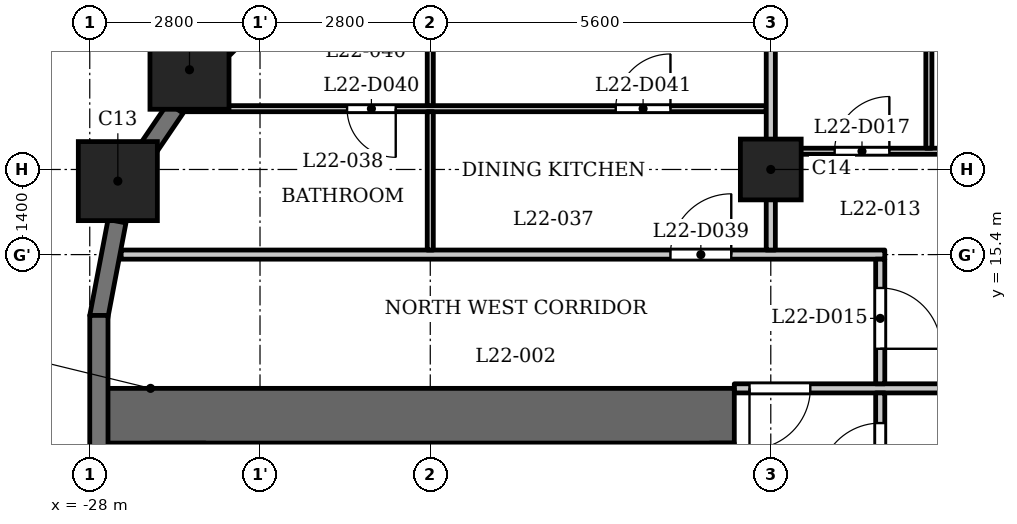
"""IFC4 building model, lengths in metres.
Left out: names, types, materials, properties, quantities, classifications, styles, units other than length and angle.
Written with IfcOpenShell. Run it as: python <this file> out.ifc"""

import sys

from ifc_helpers import new_model, si_unit, direction, frame, frame_2d, origin, origin_2d, place, context, subcontext, project, spatial, rectangle, extrude, element, fill, save


model = new_model("IFC4")
c1 = context("Model", 3, precision=1e-05, world=origin(), true_north=direction((0.0, 1.0)))
c2 = subcontext(c1, "Body", "Model", "MODEL_VIEW")
j1 = project(units=[si_unit("LENGTHUNIT", "METRE"), si_unit("PLANEANGLEUNIT", "RADIAN")], contexts=[c1])
p1 = place(None, origin())
s1 = spatial("IfcSite", under=j1, at=p1, CompositionType="ELEMENT")
p2 = place(p1, origin())
s2 = spatial("IfcBuilding", under=s1, at=p2, CompositionType="ELEMENT")
p3 = place(p2, frame((0.0, 0.0, 90.3)))
s3 = spatial("IfcBuildingStorey", under=s2, at=p3, CompositionType="ELEMENT", Elevation=90.3)
for number, where, z_axis, x_axis in (
    (1, (-26.36, 18.44, 0.0), (0.0, 0.0, 1.0), (1.0, 0.0, 0.0)),
    (2, (-27.538, 16.609, 0.0), (0.0, 0.0, 1.0), (1.0, 0.0, 0.0)),
):
    element("IfcColumn", number, at=place(p3, frame(where, z_axis=z_axis, x_axis=x_axis)), inside=s3, PredefinedType="COLUMN", context=c2, shape_type="SweptSolid", body=[
        extrude(rectangle(XDim=1.3, YDim=1.3, at=origin_2d()), origin(), (0.0, 0.0, 1.0), 3.5),
    ])
p4 = place(p3, frame((-16.8, 16.8, 0.0), z_axis=(0.0, 0.0, 1.0), x_axis=(1.0, 0.0, 0.0)))
e3 = element("IfcColumn", 3, at=p4, inside=s3, PredefinedType="COLUMN", context=c2, shape_type="SweptSolid", body=[
    extrude(rectangle(XDim=1.0, YDim=1.0, at=origin_2d()), origin(), (0.0, 0.0, 1.0), 3.5),
])
p5 = place(p3, frame((-23.991, 20.597, 0.0), z_axis=(0.0, 0.0, 1.0), x_axis=(-0.707106781187, -0.707106781187, 0.0)))
e4 = element("IfcWall", 4, at=p5, inside=s3, PredefinedType="SOLIDWALL", context=c2, shape_type="SweptSolid", body=[
    extrude(rectangle(XDim=2.55, YDim=0.3, at=frame_2d((1.275, 0.0))), origin(), (0.0, 0.0, 1.0), 2.4),
])
p6 = place(p5, frame((0.875, 0.0, 0.6)))
e5 = element("IfcOpeningElement", 5, at=p6, cuts=e4, PredefinedType="OPENING", context=c2, shape_type="SweptSolid", body=[
    extrude(rectangle(XDim=0.8, YDim=1.55, at=frame_2d((0.4, 0.775))), frame((0.0, 0.16, 0.0), z_axis=(0.0, -1.0, 0.0), x_axis=(1.0, 0.0, 0.0)), (0.0, 0.0, 1.0), 0.32),
])
p7 = place(p3, frame((-26.589, 17.81, 0.0), z_axis=(0.0, 0.0, 1.0), x_axis=(-0.562066330934, -0.827092159091, 0.0)))
e6 = element("IfcWall", 6, at=p7, inside=s3, PredefinedType="SOLIDWALL", context=c2, shape_type="SweptSolid", body=[
    extrude(rectangle(XDim=0.877, YDim=0.3, at=frame_2d((0.438, 0.0))), origin(), (0.0, 0.0, 1.0), 3.2),
])
p8 = place(p3, frame((-27.552, 15.949, 0.0), z_axis=(0.0, 0.0, 1.0), x_axis=(-0.187279751651, -0.982306619453, 0.0)))
e7 = element("IfcWall", 7, at=p8, inside=s3, PredefinedType="SOLIDWALL", context=c2, shape_type="SweptSolid", body=[
    extrude(rectangle(XDim=1.606, YDim=0.3, at=frame_2d((0.803, 0.0))), origin(), (0.0, 0.0, 1.0), 2.4),
])
p9 = place(p3, frame((-27.85, 14.4, 0.0), z_axis=(0.0, 0.0, 1.0), x_axis=(0.0, -1.0, 0.0)))
e8 = element("IfcWall", 8, at=p9, inside=s3, PredefinedType="SOLIDWALL", context=c2, shape_type="SweptSolid", body=[
    extrude(rectangle(XDim=2.55, YDim=0.3, at=frame_2d((1.275, 0.0))), origin(), (0.0, 0.0, 1.0), 2.4),
])
p10 = place(p3, frame((-17.4, 12.75, 0.0), z_axis=(0.0, 0.0, 1.0), x_axis=(-1.0, 0.0, 0.0)))
e9 = element("IfcWall", 9, at=p10, inside=s3, PredefinedType="SHEAR", context=c2, shape_type="SweptSolid", body=[
    extrude(rectangle(XDim=10.4, YDim=0.9, at=frame_2d((5.2, 0.0))), origin(), (0.0, 0.0, 1.0), 3.2),
])
p11 = place(p3, frame((-17.6, -12.3, 0.0), z_axis=(0.0, 0.0, 1.0), x_axis=(0.0, 1.0, 0.0)))
e10 = element("IfcWall", 10, at=p11, inside=s3, PredefinedType="SHEAR", context=c2, shape_type="SweptSolid", body=[
    extrude(rectangle(XDim=24.6, YDim=0.4, at=frame_2d((12.3, 0.0))), origin(), (0.0, 0.0, 1.0), 3.2),
])
p12 = place(p11, frame((6.0, 0.0, 0.0)))
e11 = element("IfcOpeningElement", 11, at=p12, cuts=e10, PredefinedType="OPENING", context=c2, shape_type="SweptSolid", body=[
    extrude(rectangle(XDim=1.1, YDim=2.1, at=frame_2d((0.55, 1.05))), frame((0.0, 0.21, 0.0), z_axis=(0.0, -1.0, 0.0), x_axis=(1.0, 0.0, 0.0)), (0.0, 0.0, 1.0), 0.42),
])
p13 = place(p11, frame((8.4, 0.0, 0.0)))
e12 = element("IfcOpeningElement", 12, at=p13, cuts=e10, PredefinedType="OPENING", context=c2, shape_type="SweptSolid", body=[
    extrude(rectangle(XDim=1.1, YDim=2.1, at=frame_2d((0.55, 1.05))), frame((0.0, 0.21, 0.0), z_axis=(0.0, -1.0, 0.0), x_axis=(1.0, 0.0, 0.0)), (0.0, 0.0, 1.0), 0.42),
])
p14 = place(p11, frame((10.8, 0.0, 0.0)))
e13 = element("IfcOpeningElement", 13, at=p14, cuts=e10, PredefinedType="OPENING", context=c2, shape_type="SweptSolid", body=[
    extrude(rectangle(XDim=1.1, YDim=2.1, at=frame_2d((0.55, 1.05))), frame((0.0, 0.21, 0.0), z_axis=(0.0, -1.0, 0.0), x_axis=(1.0, 0.0, 0.0)), (0.0, 0.0, 1.0), 0.42),
])
p15 = place(p11, frame((16.75, 0.0, 0.0)))
e14 = element("IfcOpeningElement", 14, at=p15, cuts=e10, PredefinedType="OPENING", context=c2, shape_type="SweptSolid", body=[
    extrude(rectangle(XDim=0.9, YDim=2.1, at=frame_2d((0.45, 1.05))), frame((0.0, 0.21, 0.0), z_axis=(0.0, -1.0, 0.0), x_axis=(1.0, 0.0, 0.0)), (0.0, 0.0, 1.0), 0.42),
])
p16 = place(p11, frame((22.8, 0.0, 0.0)))
e15 = element("IfcOpeningElement", 15, at=p16, cuts=e10, PredefinedType="OPENING", context=c2, shape_type="SweptSolid", body=[
    extrude(rectangle(XDim=1.1, YDim=2.1, at=frame_2d((0.55, 1.05))), frame((0.0, 0.21, 0.0), z_axis=(0.0, -1.0, 0.0), x_axis=(1.0, 0.0, 0.0)), (0.0, 0.0, 1.0), 0.42),
])
p17 = place(p11, frame((0.7, 0.0, 0.0)))
e16 = element("IfcOpeningElement", 16, at=p17, cuts=e10, PredefinedType="OPENING", context=c2, shape_type="SweptSolid", body=[
    extrude(rectangle(XDim=1.1, YDim=2.1, at=frame_2d((0.55, 1.05))), frame((0.0, 0.21, 0.0), z_axis=(0.0, -1.0, 0.0), x_axis=(1.0, 0.0, 0.0)), (0.0, 0.0, 1.0), 0.42),
])
p18 = place(p11, frame((12.775, 0.0, 0.0)))
e17 = element("IfcOpeningElement", 17, at=p18, cuts=e10, PredefinedType="OPENING", context=c2, shape_type="SweptSolid", body=[
    extrude(rectangle(XDim=1.8, YDim=2.1, at=frame_2d((0.9, 1.05))), frame((0.0, 0.21, 0.0), z_axis=(0.0, -1.0, 0.0), x_axis=(1.0, 0.0, 0.0)), (0.0, 0.0, 1.0), 0.42),
])
p19 = place(p3, frame((-26.55, -12.3, 0.0), z_axis=(0.0, 0.0, 1.0), x_axis=(0.0, 1.0, 0.0)))
e18 = element("IfcWall", 18, at=p19, inside=s3, PredefinedType="SHEAR", context=c2, shape_type="SweptSolid", body=[
    extrude(rectangle(XDim=24.6, YDim=0.9, at=frame_2d((12.3, 0.0))), origin(), (0.0, 0.0, 1.0), 3.2),
])
p20 = place(p3, frame((-23.55, 9.8, 0.0), z_axis=(0.0, 0.0, 1.0), x_axis=(0.0, 1.0, 0.0)))
e19 = element("IfcWall", 19, at=p20, inside=s3, PredefinedType="PARTITIONING", context=c2, shape_type="SweptSolid", body=[
    extrude(rectangle(XDim=2.5, YDim=0.2, at=frame_2d((1.25, 0.0))), origin(), (0.0, 0.0, 1.0), 3.2),
])
p21 = place(p20, frame((0.8, 0.0, 0.0)))
e20 = element("IfcOpeningElement", 20, at=p21, cuts=e19, PredefinedType="OPENING", context=c2, shape_type="SweptSolid", body=[
    extrude(rectangle(XDim=0.9, YDim=2.1, at=frame_2d((0.45, 1.05))), frame((0.0, 0.11, 0.0), z_axis=(0.0, -1.0, 0.0), x_axis=(1.0, 0.0, 0.0)), (0.0, 0.0, 1.0), 0.22),
])
p22 = place(p3, frame((-17.4, 13.2, 0.0), z_axis=(0.0, 0.0, 1.0), x_axis=(1.0, 0.0, 0.0)))
e21 = element("IfcWall", 21, at=p22, inside=s3, PredefinedType="PARTITIONING", context=c2, shape_type="SweptSolid", body=[
    extrude(rectangle(XDim=34.8, YDim=0.15, at=frame_2d((17.4, 0.0))), origin(), (0.0, 0.0, 1.0), 3.2),
])
p23 = place(p22, frame((0.25, 0.0, 0.0)))
e22 = element("IfcOpeningElement", 22, at=p23, cuts=e21, PredefinedType="OPENING", context=c2, shape_type="SweptSolid", body=[
    extrude(rectangle(XDim=1.0, YDim=2.1, at=frame_2d((0.5, 1.05))), frame((0.0, 0.085, 0.0), z_axis=(0.0, -1.0, 0.0), x_axis=(1.0, 0.0, 0.0)), (0.0, 0.0, 1.0), 0.17),
])
p24 = place(p22, frame((33.65, 0.0, 0.0)))
e23 = element("IfcOpeningElement", 23, at=p24, cuts=e21, PredefinedType="OPENING", context=c2, shape_type="SweptSolid", body=[
    extrude(rectangle(XDim=1.0, YDim=2.1, at=frame_2d((0.5, 1.05))), frame((0.0, 0.085, 0.0), z_axis=(0.0, -1.0, 0.0), x_axis=(1.0, 0.0, 0.0)), (0.0, 0.0, 1.0), 0.17),
])
p25 = place(p22, frame((15.75, 0.0, 0.0)))
e24 = element("IfcOpeningElement", 24, at=p25, cuts=e21, PredefinedType="OPENING", context=c2, shape_type="SweptSolid", body=[
    extrude(rectangle(XDim=1.0, YDim=2.1, at=frame_2d((0.5, 1.05))), frame((0.0, 0.085, 0.0), z_axis=(0.0, -1.0, 0.0), x_axis=(1.0, 0.0, 0.0)), (0.0, 0.0, 1.0), 0.17),
])
p26 = place(p22, frame((21.35, 0.0, 0.0)))
e25 = element("IfcOpeningElement", 25, at=p26, cuts=e21, PredefinedType="OPENING", context=c2, shape_type="SweptSolid", body=[
    extrude(rectangle(XDim=1.0, YDim=2.1, at=frame_2d((0.5, 1.05))), frame((0.0, 0.085, 0.0), z_axis=(0.0, -1.0, 0.0), x_axis=(1.0, 0.0, 0.0)), (0.0, 0.0, 1.0), 0.17),
])
p27 = place(p3, frame((-27.484, 15.4, 0.0), z_axis=(0.0, 0.0, 1.0), x_axis=(1.0, 0.0, 0.0)))
e26 = element("IfcWall", 26, at=p27, inside=s3, PredefinedType="PARTITIONING", context=c2, shape_type="SweptSolid", body=[
    extrude(rectangle(XDim=12.559, YDim=0.15, at=frame_2d((6.279, 0.0))), origin(), (0.0, 0.0, 1.0), 3.2),
])
p28 = place(p27, frame((9.034, 0.0, 0.0)))
e27 = element("IfcOpeningElement", 27, at=p28, cuts=e26, PredefinedType="OPENING", context=c2, shape_type="SweptSolid", body=[
    extrude(rectangle(XDim=1.0, YDim=2.1, at=frame_2d((0.5, 1.05))), frame((0.0, 0.085, 0.0), z_axis=(0.0, -1.0, 0.0), x_axis=(1.0, 0.0, 0.0)), (0.0, 0.0, 1.0), 0.17),
])
p29 = place(p3, frame((-16.725, 17.1, 0.0), z_axis=(0.0, 0.0, 1.0), x_axis=(1.0, 0.0, 0.0)))
e28 = element("IfcWall", 28, at=p29, inside=s3, PredefinedType="PARTITIONING", context=c2, shape_type="SweptSolid", body=[
    extrude(rectangle(XDim=33.45, YDim=0.1, at=frame_2d((16.725, 0.0))), origin(), (0.0, 0.0, 1.0), 3.2),
])
p30 = place(p29, frame((3.925, 0.0, 0.0)))
e29 = element("IfcOpeningElement", 29, at=p30, cuts=e28, PredefinedType="OPENING", context=c2, shape_type="SweptSolid", body=[
    extrude(rectangle(XDim=0.8, YDim=2.1, at=frame_2d((0.4, 1.05))), frame((0.0, 0.06, 0.0), z_axis=(0.0, -1.0, 0.0), x_axis=(1.0, 0.0, 0.0)), (0.0, 0.0, 1.0), 0.12),
])
p31 = place(p29, frame((0.975, 0.0, 0.0)))
e30 = element("IfcOpeningElement", 30, at=p31, cuts=e28, PredefinedType="OPENING", context=c2, shape_type="SweptSolid", body=[
    extrude(rectangle(XDim=0.9, YDim=2.1, at=frame_2d((0.45, 1.05))), frame((0.0, 0.06, 0.0), z_axis=(0.0, -1.0, 0.0), x_axis=(1.0, 0.0, 0.0)), (0.0, 0.0, 1.0), 0.12),
])
p32 = place(p29, frame((6.425, 0.0, 0.0)))
e31 = element("IfcOpeningElement", 31, at=p32, cuts=e28, PredefinedType="OPENING", context=c2, shape_type="SweptSolid", body=[
    extrude(rectangle(XDim=0.8, YDim=2.1, at=frame_2d((0.4, 1.05))), frame((0.0, 0.06, 0.0), z_axis=(0.0, -1.0, 0.0), x_axis=(1.0, 0.0, 0.0)), (0.0, 0.0, 1.0), 0.12),
])
p33 = place(p29, frame((8.825, 0.0, 0.0)))
e32 = element("IfcOpeningElement", 32, at=p33, cuts=e28, PredefinedType="OPENING", context=c2, shape_type="SweptSolid", body=[
    extrude(rectangle(XDim=0.9, YDim=2.1, at=frame_2d((0.45, 1.05))), frame((0.0, 0.06, 0.0), z_axis=(0.0, -1.0, 0.0), x_axis=(1.0, 0.0, 0.0)), (0.0, 0.0, 1.0), 0.12),
])
p34 = place(p29, frame((12.375, 0.0, 0.0)))
e33 = element("IfcOpeningElement", 33, at=p34, cuts=e28, PredefinedType="OPENING", context=c2, shape_type="SweptSolid", body=[
    extrude(rectangle(XDim=0.9, YDim=2.1, at=frame_2d((0.45, 1.05))), frame((0.0, 0.06, 0.0), z_axis=(0.0, -1.0, 0.0), x_axis=(1.0, 0.0, 0.0)), (0.0, 0.0, 1.0), 0.12),
])
p35 = place(p29, frame((14.425, 0.0, 0.0)))
e34 = element("IfcOpeningElement", 34, at=p35, cuts=e28, PredefinedType="OPENING", context=c2, shape_type="SweptSolid", body=[
    extrude(rectangle(XDim=0.9, YDim=2.1, at=frame_2d((0.45, 1.05))), frame((0.0, 0.06, 0.0), z_axis=(0.0, -1.0, 0.0), x_axis=(1.0, 0.0, 0.0)), (0.0, 0.0, 1.0), 0.12),
])
p36 = place(p29, frame((26.225, 0.0, 0.0)))
e35 = element("IfcOpeningElement", 35, at=p36, cuts=e28, PredefinedType="OPENING", context=c2, shape_type="SweptSolid", body=[
    extrude(rectangle(XDim=0.8, YDim=2.1, at=frame_2d((0.4, 1.05))), frame((0.0, 0.06, 0.0), z_axis=(0.0, -1.0, 0.0), x_axis=(1.0, 0.0, 0.0)), (0.0, 0.0, 1.0), 0.12),
])
p37 = place(p29, frame((23.025, 0.0, 0.0)))
e36 = element("IfcOpeningElement", 36, at=p37, cuts=e28, PredefinedType="OPENING", context=c2, shape_type="SweptSolid", body=[
    extrude(rectangle(XDim=0.9, YDim=2.1, at=frame_2d((0.45, 1.05))), frame((0.0, 0.06, 0.0), z_axis=(0.0, -1.0, 0.0), x_axis=(1.0, 0.0, 0.0)), (0.0, 0.0, 1.0), 0.12),
])
p38 = place(p29, frame((17.775, 0.0, 0.0)))
e37 = element("IfcOpeningElement", 37, at=p38, cuts=e28, PredefinedType="OPENING", context=c2, shape_type="SweptSolid", body=[
    extrude(rectangle(XDim=0.9, YDim=2.1, at=frame_2d((0.45, 1.05))), frame((0.0, 0.06, 0.0), z_axis=(0.0, -1.0, 0.0), x_axis=(1.0, 0.0, 0.0)), (0.0, 0.0, 1.0), 0.12),
])
p39 = place(p29, frame((20.025, 0.0, 0.0)))
e38 = element("IfcOpeningElement", 38, at=p39, cuts=e28, PredefinedType="OPENING", context=c2, shape_type="SweptSolid", body=[
    extrude(rectangle(XDim=0.9, YDim=2.1, at=frame_2d((0.45, 1.05))), frame((0.0, 0.06, 0.0), z_axis=(0.0, -1.0, 0.0), x_axis=(1.0, 0.0, 0.0)), (0.0, 0.0, 1.0), 0.12),
])
p40 = place(p29, frame((28.825, 0.0, 0.0)))
e39 = element("IfcOpeningElement", 39, at=p40, cuts=e28, PredefinedType="OPENING", context=c2, shape_type="SweptSolid", body=[
    extrude(rectangle(XDim=0.8, YDim=2.1, at=frame_2d((0.4, 1.05))), frame((0.0, 0.06, 0.0), z_axis=(0.0, -1.0, 0.0), x_axis=(1.0, 0.0, 0.0)), (0.0, 0.0, 1.0), 0.12),
])
p41 = place(p29, frame((31.975, 0.0, 0.0)))
e40 = element("IfcOpeningElement", 40, at=p41, cuts=e28, PredefinedType="OPENING", context=c2, shape_type="SweptSolid", body=[
    extrude(rectangle(XDim=0.9, YDim=2.1, at=frame_2d((0.45, 1.05))), frame((0.0, 0.06, 0.0), z_axis=(0.0, -1.0, 0.0), x_axis=(1.0, 0.0, 0.0)), (0.0, 0.0, 1.0), 0.12),
])
p42 = place(p3, frame((-26.554, 17.8, 0.0), z_axis=(0.0, 0.0, 1.0), x_axis=(1.0, 0.0, 0.0)))
e41 = element("IfcWall", 41, at=p42, inside=s3, PredefinedType="PARTITIONING", context=c2, shape_type="SweptSolid", body=[
    extrude(rectangle(XDim=9.679, YDim=0.1, at=frame_2d((4.84, 0.0))), origin(), (0.0, 0.0, 1.0), 3.2),
])
p43 = place(p42, frame((2.786, 0.0, 0.0)))
e42 = element("IfcOpeningElement", 42, at=p43, cuts=e41, PredefinedType="OPENING", context=c2, shape_type="SweptSolid", body=[
    extrude(rectangle(XDim=0.8, YDim=2.1, at=frame_2d((0.4, 1.05))), frame((0.0, 0.06, 0.0), z_axis=(0.0, -1.0, 0.0), x_axis=(1.0, 0.0, 0.0)), (0.0, 0.0, 1.0), 0.12),
])
p44 = place(p42, frame((7.204, 0.0, 0.0)))
e43 = element("IfcOpeningElement", 43, at=p44, cuts=e41, PredefinedType="OPENING", context=c2, shape_type="SweptSolid", body=[
    extrude(rectangle(XDim=0.9, YDim=2.1, at=frame_2d((0.45, 1.05))), frame((0.0, 0.06, 0.0), z_axis=(0.0, -1.0, 0.0), x_axis=(1.0, 0.0, 0.0)), (0.0, 0.0, 1.0), 0.12),
])
p45 = place(p3, frame((-22.4, 15.475, 0.0), z_axis=(0.0, 0.0, 1.0), x_axis=(0.0, 1.0, 0.0)))
e44 = element("IfcWall", 44, at=p45, inside=s3, PredefinedType="PARTITIONING", context=c2, shape_type="SweptSolid", body=[
    extrude(rectangle(XDim=2.275, YDim=0.1, at=frame_2d((1.137, 0.0))), origin(), (0.0, 0.0, 1.0), 3.2),
])
p46 = place(p3, frame((-22.4, 17.85, 0.0), z_axis=(0.0, 0.0, 1.0), x_axis=(0.0, 1.0, 0.0)))
e45 = element("IfcWall", 45, at=p46, inside=s3, PredefinedType="PARTITIONING", context=c2, shape_type="SweptSolid", body=[
    extrude(rectangle(XDim=3.87, YDim=0.1, at=frame_2d((1.935, 0.0))), origin(), (0.0, 0.0, 1.0), 3.2),
])
p47 = place(p46, frame((1.348, 0.0, 0.0)))
e46 = element("IfcOpeningElement", 46, at=p47, cuts=e45, PredefinedType="OPENING", context=c2, shape_type="SweptSolid", body=[
    extrude(rectangle(XDim=0.9, YDim=2.1, at=frame_2d((0.45, 1.05))), frame((0.0, 0.06, 0.0), z_axis=(0.0, -1.0, 0.0), x_axis=(1.0, 0.0, 0.0)), (0.0, 0.0, 1.0), 0.12),
])
p48 = place(p3, frame((-16.8, 15.475, 0.0), z_axis=(0.0, 0.0, 1.0), x_axis=(0.0, 1.0, 0.0)))
e47 = element("IfcWall", 47, at=p48, inside=s3, PredefinedType="PARTITIONING", context=c2, shape_type="SweptSolid", body=[
    extrude(rectangle(XDim=7.555, YDim=0.15, at=frame_2d((3.777, 0.0))), origin(), (0.0, 0.0, 1.0), 3.2),
])
p49 = place(p3, frame((-15.0, 6.769, 0.0), z_axis=(0.0, 0.0, 1.0), x_axis=(0.0, 1.0, 0.0)))
e48 = element("IfcWall", 48, at=p49, inside=s3, PredefinedType="PARTITIONING", context=c2, shape_type="SweptSolid", body=[
    extrude(rectangle(XDim=6.356, YDim=0.15, at=frame_2d((3.178, 0.0))), origin(), (0.0, 0.0, 1.0), 3.2),
])
p50 = place(p49, frame((4.86, 0.0, 0.0)))
e49 = element("IfcOpeningElement", 49, at=p50, cuts=e48, PredefinedType="OPENING", context=c2, shape_type="SweptSolid", body=[
    extrude(rectangle(XDim=1.0, YDim=2.1, at=frame_2d((0.5, 1.05))), frame((0.0, 0.085, 0.0), z_axis=(0.0, -1.0, 0.0), x_axis=(1.0, 0.0, 0.0)), (0.0, 0.0, 1.0), 0.17),
])
p51 = place(p3, frame((-15.0, 13.275, 0.0), z_axis=(0.0, 0.0, 1.0), x_axis=(0.0, 1.0, 0.0)))
e50 = element("IfcWall", 50, at=p51, inside=s3, PredefinedType="PARTITIONING", context=c2, shape_type="SweptSolid", body=[
    extrude(rectangle(XDim=2.05, YDim=0.15, at=frame_2d((1.025, 0.0))), origin(), (0.0, 0.0, 1.0), 3.2),
])
p52 = place(p51, frame((0.576, 0.0, 0.0)))
e51 = element("IfcOpeningElement", 51, at=p52, cuts=e50, PredefinedType="OPENING", context=c2, shape_type="SweptSolid", body=[
    extrude(rectangle(XDim=1.0, YDim=2.1, at=frame_2d((0.5, 1.05))), frame((0.0, 0.085, 0.0), z_axis=(0.0, -1.0, 0.0), x_axis=(1.0, 0.0, 0.0)), (0.0, 0.0, 1.0), 0.17),
])
p53 = place(p3, frame((-14.2, 17.15, 0.0), z_axis=(0.0, 0.0, 1.0), x_axis=(0.0, 1.0, 0.0)))
e52 = element("IfcWall", 52, at=p53, inside=s3, PredefinedType="PARTITIONING", context=c2, shape_type="SweptSolid", body=[
    extrude(rectangle(XDim=4.93, YDim=0.1, at=frame_2d((2.465, 0.0))), origin(), (0.0, 0.0, 1.0), 3.2),
])
p54 = place(p53, frame((3.6, 0.0, 0.0)))
e53 = element("IfcOpeningElement", 53, at=p54, cuts=e52, PredefinedType="OPENING", context=c2, shape_type="SweptSolid", body=[
    extrude(rectangle(XDim=0.9, YDim=2.1, at=frame_2d((0.45, 1.05))), frame((0.0, 0.06, 0.0), z_axis=(0.0, -1.0, 0.0), x_axis=(1.0, 0.0, 0.0)), (0.0, 0.0, 1.0), 0.12),
])
p55 = place(p50, origin())
e54 = element("IfcDoor", 54, at=p55, inside=s3, OperationType="SINGLE_SWING_RIGHT", PredefinedType="DOOR", context=c2, shape_type="SweptSolid", body=[
    extrude(rectangle(XDim=1.0, YDim=2.1, at=frame_2d((0.5, 1.05))), frame((0.0, 0.025, 0.0), z_axis=(0.0, -1.0, 0.0), x_axis=(1.0, 0.0, 0.0)), (0.0, 0.0, 1.0), 0.05),
])
fill(e49, e54)
p56 = place(p23, origin())
e55 = element("IfcDoor", 55, at=p56, inside=s3, OperationType="SINGLE_SWING_LEFT", PredefinedType="DOOR", context=c2, shape_type="SweptSolid", body=[
    extrude(rectangle(XDim=1.0, YDim=2.1, at=frame_2d((0.5, 1.05))), frame((0.0, 0.025, 0.0), z_axis=(0.0, -1.0, 0.0), x_axis=(1.0, 0.0, 0.0)), (0.0, 0.0, 1.0), 0.05),
])
fill(e22, e55)
p57 = place(p52, origin())
e56 = element("IfcDoor", 56, at=p57, inside=s3, OperationType="SINGLE_SWING_LEFT", PredefinedType="DOOR", context=c2, shape_type="SweptSolid", body=[
    extrude(rectangle(XDim=1.0, YDim=2.1, at=frame_2d((0.5, 1.05))), frame((0.0, 0.025, 0.0), z_axis=(0.0, -1.0, 0.0), x_axis=(1.0, 0.0, 0.0)), (0.0, 0.0, 1.0), 0.05),
])
fill(e51, e56)
p58 = place(p31, origin())
e57 = element("IfcDoor", 57, at=p58, inside=s3, OperationType="SINGLE_SWING_LEFT", PredefinedType="DOOR", context=c2, shape_type="SweptSolid", body=[
    extrude(rectangle(XDim=0.9, YDim=2.1, at=frame_2d((0.45, 1.05))), frame((0.0, 0.025, 0.0), z_axis=(0.0, -1.0, 0.0), x_axis=(1.0, 0.0, 0.0)), (0.0, 0.0, 1.0), 0.05),
])
fill(e30, e57)
p59 = place(p28, origin())
e58 = element("IfcDoor", 58, at=p59, inside=s3, OperationType="SINGLE_SWING_LEFT", PredefinedType="DOOR", context=c2, shape_type="SweptSolid", body=[
    extrude(rectangle(XDim=1.0, YDim=2.1, at=frame_2d((0.5, 1.05))), frame((0.0, 0.025, 0.0), z_axis=(0.0, -1.0, 0.0), x_axis=(1.0, 0.0, 0.0)), (0.0, 0.0, 1.0), 0.05),
])
fill(e27, e58)
p60 = place(p43, origin())
e59 = element("IfcDoor", 59, at=p60, inside=s3, OperationType="SINGLE_SWING_RIGHT", PredefinedType="DOOR", context=c2, shape_type="SweptSolid", body=[
    extrude(rectangle(XDim=0.8, YDim=2.1, at=frame_2d((0.4, 1.05))), frame((0.0, 0.025, 0.0), z_axis=(0.0, -1.0, 0.0), x_axis=(1.0, 0.0, 0.0)), (0.0, 0.0, 1.0), 0.05),
])
fill(e42, e59)
p61 = place(p44, origin())
e60 = element("IfcDoor", 60, at=p61, inside=s3, OperationType="SINGLE_SWING_LEFT", PredefinedType="DOOR", context=c2, shape_type="SweptSolid", body=[
    extrude(rectangle(XDim=0.9, YDim=2.1, at=frame_2d((0.45, 1.05))), frame((0.0, 0.025, 0.0), z_axis=(0.0, -1.0, 0.0), x_axis=(1.0, 0.0, 0.0)), (0.0, 0.0, 1.0), 0.05),
])
fill(e43, e60)
save(model, sys.argv[1])
